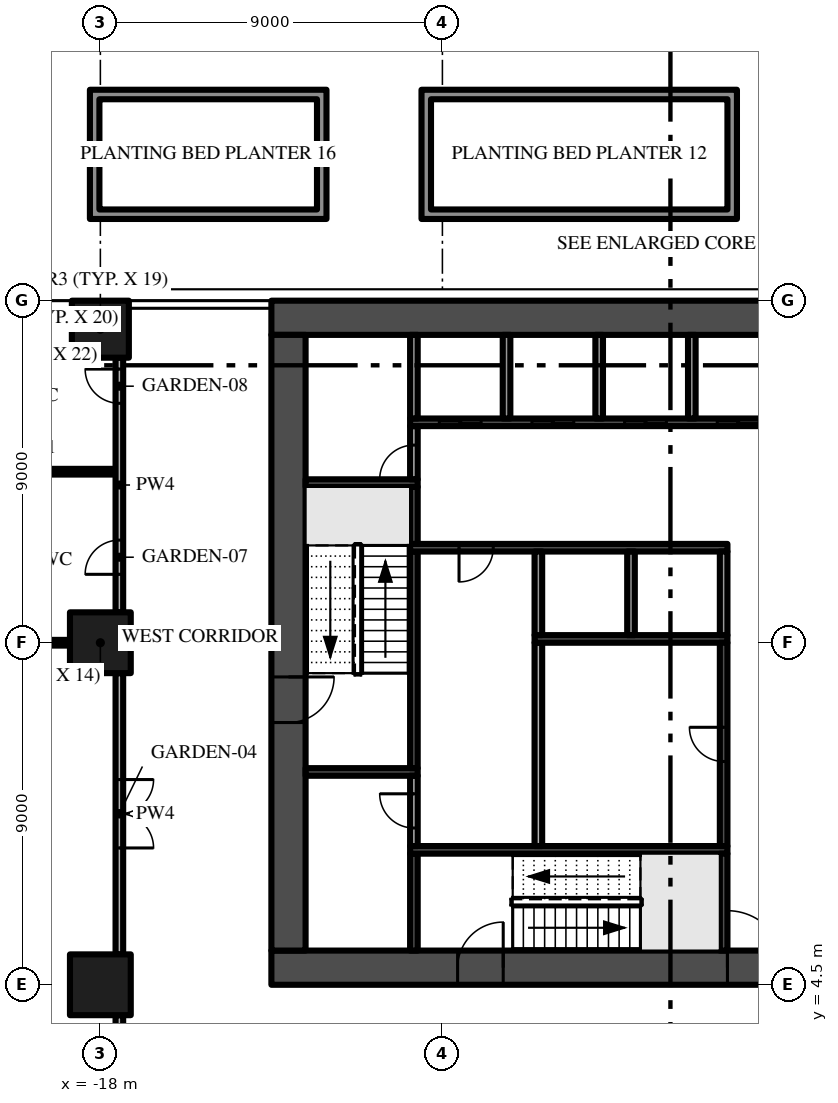
"""IFC4 building model, lengths in metres.
Left out: names, types, materials, properties, quantities, classifications, styles, units other than length and angle.
Written with IfcOpenShell. Run it as: python <this file> out.ifc"""

import sys

from ifc_helpers import new_model, si_unit, direction, frame, frame_2d, origin, origin_2d, place, context, subcontext, project, spatial, polyline, rectangle, outline, extrude, element, fill, save


model = new_model("IFC4")
c1 = context("Model", 3, precision=1e-05, world=origin(), true_north=direction((0.0, 1.0)))
c2 = subcontext(c1, "Body", "Model", "MODEL_VIEW")
j1 = project(units=[si_unit("LENGTHUNIT", "METRE"), si_unit("PLANEANGLEUNIT", "RADIAN")], contexts=[c1])
p1 = place(None, origin())
s1 = spatial("IfcSite", under=j1, at=p1, CompositionType="ELEMENT")
p2 = place(p1, origin())
s2 = spatial("IfcBuilding", under=s1, at=p2, CompositionType="ELEMENT")
p3 = place(p2, frame((0.0, 0.0, 10.5)))
s3 = spatial("IfcBuildingStorey", under=s2, at=p3, CompositionType="ELEMENT", Elevation=10.5)
p4 = place(p3, frame((-13.5, 4.95, -0.35), z_axis=(0.0, 0.0, 1.0), x_axis=(1.0, 0.0, 0.0)))
e1 = element("IfcWall", 1, at=p4, inside=s3, PredefinedType="SHEAR", context=c2, shape_type="SweptSolid", body=[
    extrude(rectangle(XDim=27.0, YDim=0.9, at=frame_2d((13.5, 0.0))), origin(), (0.0, 0.0, 1.0), 4.55),
])
p5 = place(p4, frame((12.0, 0.0, 0.35)))
e2 = element("IfcOpeningElement", 2, at=p5, cuts=e1, PredefinedType="OPENING", context=c2, shape_type="SweptSolid", body=[
    extrude(rectangle(XDim=3.0, YDim=2.4, at=frame_2d((1.5, 1.2))), frame((0.0, 0.46, 0.0), z_axis=(0.0, -1.0, 0.0), x_axis=(1.0, 0.0, 0.0)), (0.0, 0.0, 1.0), 0.92),
])
p6 = place(p4, frame((4.9, 0.0, 0.35)))
e3 = element("IfcOpeningElement", 3, at=p6, cuts=e1, PredefinedType="OPENING", context=c2, shape_type="SweptSolid", body=[
    extrude(rectangle(XDim=1.2, YDim=2.2, at=frame_2d((0.6, 1.1))), frame((0.0, 0.46, 0.0), z_axis=(0.0, -1.0, 0.0), x_axis=(1.0, 0.0, 0.0)), (0.0, 0.0, 1.0), 0.92),
])
p7 = place(p4, frame((20.75, 0.0, 0.35)))
e4 = element("IfcOpeningElement", 4, at=p7, cuts=e1, PredefinedType="OPENING", context=c2, shape_type="SweptSolid", body=[
    extrude(rectangle(XDim=1.5, YDim=2.2, at=frame_2d((0.75, 1.1))), frame((0.0, 0.46, 0.0), z_axis=(0.0, -1.0, 0.0), x_axis=(1.0, 0.0, 0.0)), (0.0, 0.0, 1.0), 0.92),
])
p8 = place(p4, frame((17.4, 0.0, 0.35)))
e5 = element("IfcOpeningElement", 5, at=p8, cuts=e1, PredefinedType="OPENING", context=c2, shape_type="SweptSolid", body=[
    extrude(rectangle(XDim=1.2, YDim=2.2, at=frame_2d((0.6, 1.1))), frame((0.0, 0.46, 0.0), z_axis=(0.0, -1.0, 0.0), x_axis=(1.0, 0.0, 0.0)), (0.0, 0.0, 1.0), 0.92),
])
p9 = place(p3, frame((13.5, 22.05, -0.35), z_axis=(0.0, 0.0, 1.0), x_axis=(-1.0, 0.0, 0.0)))
e6 = element("IfcWall", 6, at=p9, inside=s3, PredefinedType="SHEAR", context=c2, shape_type="SweptSolid", body=[
    extrude(rectangle(XDim=27.0, YDim=0.9, at=frame_2d((13.5, 0.0))), origin(), (0.0, 0.0, 1.0), 4.55),
])
p10 = place(p3, frame((-13.05, 21.6, -0.35), z_axis=(0.0, 0.0, 1.0), x_axis=(0.0, -1.0, 0.0)))
e7 = element("IfcWall", 7, at=p10, inside=s3, PredefinedType="SHEAR", context=c2, shape_type="SweptSolid", body=[
    extrude(rectangle(XDim=16.2, YDim=0.9, at=frame_2d((8.1, 0.0))), origin(), (0.0, 0.0, 1.0), 4.55),
])
p11 = place(p10, frame((9.0, 0.0, 0.35)))
e8 = element("IfcOpeningElement", 8, at=p11, cuts=e7, PredefinedType="OPENING", context=c2, shape_type="SweptSolid", body=[
    extrude(rectangle(XDim=1.2, YDim=2.2, at=frame_2d((0.6, 1.1))), frame((0.0, 0.46, 0.0), z_axis=(0.0, -1.0, 0.0), x_axis=(1.0, 0.0, 0.0)), (0.0, 0.0, 1.0), 0.92),
])
p12 = place(p3, frame((-18.0, 13.5, 0.0), z_axis=(0.0, 0.0, 1.0), x_axis=(1.0, 0.0, 0.0)))
e9 = element("IfcColumn", 9, at=p12, inside=s3, PredefinedType="COLUMN", context=c2, shape_type="SweptSolid", body=[
    extrude(rectangle(XDim=1.6, YDim=1.6, at=origin_2d()), origin(), (0.0, 0.0, 1.0), 4.2),
])
p13 = place(p3, frame((-18.0, 21.75, 0.0), z_axis=(0.0, 0.0, 1.0), x_axis=(1.0, 0.0, 0.0)))
e10 = element("IfcColumn", 10, at=p13, inside=s3, PredefinedType="COLUMN", context=c2, shape_type="SweptSolid", body=[
    extrude(rectangle(XDim=1.5, YDim=1.5, at=origin_2d()), origin(), (0.0, 0.0, 1.0), 4.2),
])
p14 = place(p3, frame((-18.0, 4.5, 0.0), z_axis=(0.0, 0.0, 1.0), x_axis=(1.0, 0.0, 0.0)))
e11 = element("IfcColumn", 11, at=p14, inside=s3, PredefinedType="COLUMN", context=c2, shape_type="SweptSolid", body=[
    extrude(rectangle(XDim=1.6, YDim=1.6, at=origin_2d()), origin(), (0.0, 0.0, 1.0), 4.2),
])
for number, where, z_axis, x_axis in (
    (12, (-12.6, 10.1, 0.0), (0.0, 0.0, 1.0), (1.0, 0.0, 0.0)),
    (13, (-12.6, 17.7, 0.0), (0.0, 0.0, 1.0), (1.0, 0.0, 0.0)),
):
    element("IfcWall", number, at=place(p3, frame(where, z_axis=z_axis, x_axis=x_axis)), inside=s3, PredefinedType="SHEAR", context=c2, shape_type="SweptSolid", body=[
        extrude(rectangle(XDim=2.95, YDim=0.2, at=frame_2d((1.475, 0.0))), origin(), (0.0, 0.0, 1.0), 4.2),
    ])
p15 = place(p3, frame((-9.75, 5.4, 0.0), z_axis=(0.0, 0.0, 1.0), x_axis=(0.0, 1.0, 0.0)))
e14 = element("IfcWall", 14, at=p15, inside=s3, PredefinedType="SHEAR", context=c2, shape_type="SweptSolid", body=[
    extrude(rectangle(XDim=2.55, YDim=0.2, at=frame_2d((1.275, 0.0))), origin(), (0.0, 0.0, 1.0), 4.2),
])
p16 = place(p3, frame((-9.85, 8.05, 0.0), z_axis=(0.0, 0.0, 1.0), x_axis=(1.0, 0.0, 0.0)))
e15 = element("IfcWall", 15, at=p16, inside=s3, PredefinedType="SHEAR", context=c2, shape_type="SweptSolid", body=[
    extrude(rectangle(XDim=8.35, YDim=0.2, at=frame_2d((4.175, 0.0))), origin(), (0.0, 0.0, 1.0), 4.2),
])
p17 = place(p3, frame((-9.75, 8.15, 0.0), z_axis=(0.0, 0.0, 1.0), x_axis=(0.0, 1.0, 0.0)))
e16 = element("IfcWall", 16, at=p17, inside=s3, PredefinedType="PARTITIONING", context=c2, shape_type="SweptSolid", body=[
    extrude(rectangle(XDim=1.85, YDim=0.2, at=frame_2d((0.925, 0.0))), origin(), (0.0, 0.0, 1.0), 4.2),
])
p18 = place(p17, frame((0.475, 0.0, 0.0)))
e17 = element("IfcOpeningElement", 17, at=p18, cuts=e16, PredefinedType="OPENING", context=c2, shape_type="SweptSolid", body=[
    extrude(rectangle(XDim=0.9, YDim=2.1, at=frame_2d((0.45, 1.05))), frame((0.0, 0.11, 0.0), z_axis=(0.0, -1.0, 0.0), x_axis=(1.0, 0.0, 0.0)), (0.0, 0.0, 1.0), 0.22),
])
p19 = place(p3, frame((-9.75, 10.2, 0.0), z_axis=(0.0, 0.0, 1.0), x_axis=(0.0, 1.0, 0.0)))
e18 = element("IfcWall", 18, at=p19, inside=s3, PredefinedType="SHEAR", context=c2, shape_type="SweptSolid", body=[
    extrude(rectangle(XDim=5.7, YDim=0.2, at=frame_2d((2.85, 0.0))), origin(), (0.0, 0.0, 1.0), 4.2),
])
p20 = place(p3, frame((-1.5, 16.0, 0.0), z_axis=(0.0, 0.0, 1.0), x_axis=(-1.0, 0.0, 0.0)))
e19 = element("IfcWall", 19, at=p20, inside=s3, PredefinedType="SHEAR", context=c2, shape_type="SweptSolid", body=[
    extrude(rectangle(XDim=8.35, YDim=0.2, at=frame_2d((4.175, 0.0))), origin(), (0.0, 0.0, 1.0), 4.2),
])
p21 = place(p20, frame((6.162, 0.0, 0.0)))
e20 = element("IfcOpeningElement", 20, at=p21, cuts=e19, PredefinedType="OPENING", context=c2, shape_type="SweptSolid", body=[
    extrude(rectangle(XDim=0.9, YDim=2.1, at=frame_2d((0.45, 1.05))), frame((0.0, 0.11, 0.0), z_axis=(0.0, -1.0, 0.0), x_axis=(1.0, 0.0, 0.0)), (0.0, 0.0, 1.0), 0.22),
])
p22 = place(p3, frame((-9.75, 16.1, 0.0), z_axis=(0.0, 0.0, 1.0), x_axis=(0.0, 1.0, 0.0)))
e21 = element("IfcWall", 21, at=p22, inside=s3, PredefinedType="SHEAR", context=c2, shape_type="SweptSolid", body=[
    extrude(rectangle(XDim=1.5, YDim=0.2, at=frame_2d((0.75, 0.0))), origin(), (0.0, 0.0, 1.0), 4.2),
])
p23 = place(p3, frame((-9.75, 17.8, 0.0), z_axis=(0.0, 0.0, 1.0), x_axis=(0.0, 1.0, 0.0)))
e22 = element("IfcWall", 22, at=p23, inside=s3, PredefinedType="PARTITIONING", context=c2, shape_type="SweptSolid", body=[
    extrude(rectangle(XDim=1.4, YDim=0.2, at=frame_2d((0.7, 0.0))), origin(), (0.0, 0.0, 1.0), 4.2),
])
p24 = place(p23, origin())
e23 = element("IfcOpeningElement", 23, at=p24, cuts=e22, PredefinedType="OPENING", context=c2, shape_type="SweptSolid", body=[
    extrude(rectangle(XDim=0.9, YDim=2.1, at=frame_2d((0.45, 1.05))), frame((0.0, 0.11, 0.0), z_axis=(0.0, -1.0, 0.0), x_axis=(1.0, 0.0, 0.0)), (0.0, 0.0, 1.0), 0.22),
])
p25 = place(p3, frame((-9.85, 19.3, 0.0), z_axis=(0.0, 0.0, 1.0), x_axis=(1.0, 0.0, 0.0)))
e24 = element("IfcWall", 24, at=p25, inside=s3, PredefinedType="SHEAR", context=c2, shape_type="SweptSolid", body=[
    extrude(rectangle(XDim=19.7, YDim=0.2, at=frame_2d((9.85, 0.0))), origin(), (0.0, 0.0, 1.0), 4.2),
])
p26 = place(p25, frame((0.769, 0.0, 0.0)))
e25 = element("IfcOpeningElement", 25, at=p26, cuts=e24, PredefinedType="OPENING", context=c2, shape_type="SweptSolid", body=[
    extrude(rectangle(XDim=1.1, YDim=2.1, at=frame_2d((0.55, 1.05))), frame((0.0, 0.11, 0.0), z_axis=(0.0, -1.0, 0.0), x_axis=(1.0, 0.0, 0.0)), (0.0, 0.0, 1.0), 0.22),
])
p27 = place(p25, frame((3.206, 0.0, 0.0)))
e26 = element("IfcOpeningElement", 26, at=p27, cuts=e24, PredefinedType="OPENING", context=c2, shape_type="SweptSolid", body=[
    extrude(rectangle(XDim=1.1, YDim=2.1, at=frame_2d((0.55, 1.05))), frame((0.0, 0.11, 0.0), z_axis=(0.0, -1.0, 0.0), x_axis=(1.0, 0.0, 0.0)), (0.0, 0.0, 1.0), 0.22),
])
p28 = place(p25, frame((5.644, 0.0, 0.0)))
e27 = element("IfcOpeningElement", 27, at=p28, cuts=e24, PredefinedType="OPENING", context=c2, shape_type="SweptSolid", body=[
    extrude(rectangle(XDim=1.1, YDim=2.1, at=frame_2d((0.55, 1.05))), frame((0.0, 0.11, 0.0), z_axis=(0.0, -1.0, 0.0), x_axis=(1.0, 0.0, 0.0)), (0.0, 0.0, 1.0), 0.22),
])
p29 = place(p25, frame((8.081, 0.0, 0.0)))
e28 = element("IfcOpeningElement", 28, at=p29, cuts=e24, PredefinedType="OPENING", context=c2, shape_type="SweptSolid", body=[
    extrude(rectangle(XDim=1.1, YDim=2.1, at=frame_2d((0.55, 1.05))), frame((0.0, 0.11, 0.0), z_axis=(0.0, -1.0, 0.0), x_axis=(1.0, 0.0, 0.0)), (0.0, 0.0, 1.0), 0.22),
])
for number, where, z_axis, x_axis in (
    (29, (-9.75, 19.4, 0.0), (0.0, 0.0, 1.0), (0.0, 1.0, 0.0)),
    (30, (-7.312, 19.4, 0.0), (0.0, 0.0, 1.0), (0.0, 1.0, 0.0)),
):
    element("IfcWall", number, at=place(p3, frame(where, z_axis=z_axis, x_axis=x_axis)), inside=s3, PredefinedType="PARTITIONING", context=c2, shape_type="SweptSolid", body=[
        extrude(rectangle(XDim=2.2, YDim=0.2, at=frame_2d((1.1, 0.0))), origin(), (0.0, 0.0, 1.0), 4.2),
    ])
p30 = place(p3, frame((-6.475, 8.15, 0.0), z_axis=(0.0, 0.0, 1.0), x_axis=(0.0, 1.0, 0.0)))
e31 = element("IfcWall", 31, at=p30, inside=s3, PredefinedType="PARTITIONING", context=c2, shape_type="SweptSolid", body=[
    extrude(rectangle(XDim=5.35, YDim=0.2, at=frame_2d((2.675, 0.0))), origin(), (0.0, 0.0, 1.0), 4.2),
])
p31 = place(p3, frame((-6.575, 13.6, 0.0), z_axis=(0.0, 0.0, 1.0), x_axis=(1.0, 0.0, 0.0)))
e32 = element("IfcWall", 32, at=p31, inside=s3, PredefinedType="SHEAR", context=c2, shape_type="SweptSolid", body=[
    extrude(rectangle(XDim=5.075, YDim=0.2, at=frame_2d((2.538, 0.0))), origin(), (0.0, 0.0, 1.0), 4.2),
])
for number, where, z_axis, x_axis in (
    (33, (-6.475, 13.7, 0.0), (0.0, 0.0, 1.0), (0.0, 1.0, 0.0)),
    (34, (-4.875, 19.4, 0.0), (0.0, 0.0, 1.0), (0.0, 1.0, 0.0)),
    (35, (-4.037, 13.7, 0.0), (0.0, 0.0, 1.0), (0.0, 1.0, 0.0)),
    (36, (-2.438, 19.4, 0.0), (0.0, 0.0, 1.0), (0.0, 1.0, 0.0)),
):
    element("IfcWall", number, at=place(p3, frame(where, z_axis=z_axis, x_axis=x_axis)), inside=s3, PredefinedType="PARTITIONING", context=c2, shape_type="SweptSolid", body=[
        extrude(rectangle(XDim=2.2, YDim=0.2, at=frame_2d((1.1, 0.0))), origin(), (0.0, 0.0, 1.0), 4.2),
    ])
p32 = place(p3, frame((-1.6, 5.4, 0.0), z_axis=(0.0, 0.0, 1.0), x_axis=(0.0, 1.0, 0.0)))
e37 = element("IfcWall", 37, at=p32, inside=s3, PredefinedType="SHEAR", context=c2, shape_type="SweptSolid", body=[
    extrude(rectangle(XDim=2.55, YDim=0.2, at=frame_2d((1.275, 0.0))), origin(), (0.0, 0.0, 1.0), 4.2),
])
p33 = place(p3, frame((-1.6, 8.15, 0.0), z_axis=(0.0, 0.0, 1.0), x_axis=(0.0, 1.0, 0.0)))
e38 = element("IfcWall", 38, at=p33, inside=s3, PredefinedType="SHEAR", context=c2, shape_type="SweptSolid", body=[
    extrude(rectangle(XDim=5.35, YDim=0.2, at=frame_2d((2.675, 0.0))), origin(), (0.0, 0.0, 1.0), 4.2),
])
p34 = place(p33, frame((2.225, 0.0, 0.0)))
e39 = element("IfcOpeningElement", 39, at=p34, cuts=e38, PredefinedType="OPENING", context=c2, shape_type="SweptSolid", body=[
    extrude(rectangle(XDim=0.9, YDim=2.1, at=frame_2d((0.45, 1.05))), frame((0.0, 0.11, 0.0), z_axis=(0.0, -1.0, 0.0), x_axis=(1.0, 0.0, 0.0)), (0.0, 0.0, 1.0), 0.22),
])
p35 = place(p3, frame((-1.6, 13.7, 0.0), z_axis=(0.0, 0.0, 1.0), x_axis=(0.0, 1.0, 0.0)))
e40 = element("IfcWall", 40, at=p35, inside=s3, PredefinedType="PARTITIONING", context=c2, shape_type="SweptSolid", body=[
    extrude(rectangle(XDim=2.2, YDim=0.2, at=frame_2d((1.1, 0.0))), origin(), (0.0, 0.0, 1.0), 4.2),
])
p36 = place(p3, frame((-25.5, 13.5, 0.0), z_axis=(0.0, 0.0, 1.0), x_axis=(1.0, 0.0, 0.0)))
e41 = element("IfcWall", 41, at=p36, inside=s3, PredefinedType="PARTITIONING", context=c2, shape_type="SweptSolid", body=[
    extrude(rectangle(XDim=6.7, YDim=0.15, at=frame_2d((3.35, 0.0))), origin(), (0.0, 0.0, 1.0), 4.2),
])
p37 = place(p3, frame((-21.75, 18.0, 0.0), z_axis=(0.0, 0.0, 1.0), x_axis=(1.0, 0.0, 0.0)))
e42 = element("IfcWall", 42, at=p37, inside=s3, PredefinedType="PARTITIONING", context=c2, shape_type="SweptSolid", body=[
    extrude(rectangle(XDim=4.15, YDim=0.15, at=frame_2d((2.075, 0.0))), origin(), (0.0, 0.0, 1.0), 4.2),
])
p38 = place(p3, frame((-17.5, -0.175, 0.0), z_axis=(0.0, 0.0, 1.0), x_axis=(0.0, 1.0, 0.0)))
e43 = element("IfcWall", 43, at=p38, inside=s3, PredefinedType="PARTITIONING", context=c2, shape_type="SweptSolid", body=[
    extrude(rectangle(XDim=3.875, YDim=0.2, at=frame_2d((1.938, 0.0))), origin(), (0.0, 0.0, 1.0), 4.2),
])
p39 = place(p3, frame((-17.5, 12.7, 0.0), z_axis=(0.0, 0.0, 1.0), x_axis=(0.0, -1.0, 0.0)))
e44 = element("IfcWall", 44, at=p39, inside=s3, PredefinedType="PARTITIONING", context=c2, shape_type="SweptSolid", body=[
    extrude(rectangle(XDim=7.4, YDim=0.2, at=frame_2d((3.7, 0.0))), origin(), (0.0, 0.0, 1.0), 4.2),
])
p40 = place(p39, frame((2.8, 0.0, 0.0)))
e45 = element("IfcOpeningElement", 45, at=p40, cuts=e44, PredefinedType="OPENING", context=c2, shape_type="SweptSolid", body=[
    extrude(rectangle(XDim=1.8, YDim=2.4, at=frame_2d((0.9, 1.2))), frame((0.0, 0.11, 0.0), z_axis=(0.0, -1.0, 0.0), x_axis=(1.0, 0.0, 0.0)), (0.0, 0.0, 1.0), 0.22),
])
p41 = place(p3, frame((-17.5, 14.3, 0.0), z_axis=(0.0, 0.0, 1.0), x_axis=(0.0, 1.0, 0.0)))
e46 = element("IfcWall", 46, at=p41, inside=s3, PredefinedType="PARTITIONING", context=c2, shape_type="SweptSolid", body=[
    extrude(rectangle(XDim=6.7, YDim=0.2, at=frame_2d((3.35, 0.0))), origin(), (0.0, 0.0, 1.0), 4.2),
])
p42 = place(p41, frame((1.0, 0.0, 0.0)))
e47 = element("IfcOpeningElement", 47, at=p42, cuts=e46, PredefinedType="OPENING", context=c2, shape_type="SweptSolid", body=[
    extrude(rectangle(XDim=0.9, YDim=2.1, at=frame_2d((0.45, 1.05))), frame((0.0, 0.11, 0.0), z_axis=(0.0, -1.0, 0.0), x_axis=(1.0, 0.0, 0.0)), (0.0, 0.0, 1.0), 0.22),
])
p43 = place(p41, frame((5.5, 0.0, 0.0)))
e48 = element("IfcOpeningElement", 48, at=p43, cuts=e46, PredefinedType="OPENING", context=c2, shape_type="SweptSolid", body=[
    extrude(rectangle(XDim=0.9, YDim=2.1, at=frame_2d((0.45, 1.05))), frame((0.0, 0.11, 0.0), z_axis=(0.0, -1.0, 0.0), x_axis=(1.0, 0.0, 0.0)), (0.0, 0.0, 1.0), 0.22),
])
p44 = place(p3, frame((0.0, 0.0, 0.05)))
e49 = element("IfcWall", 49, at=p44, inside=s3, PredefinedType="USERDEFINED", context=c2, shape_type="SweptSolid", body=[
    extrude(outline(polyline([(-9.55, 24.65), (-1.25, 24.65), (-1.25, 28.05), (-9.55, 28.05), (-9.55, 24.65)]), holes=[polyline([(-9.3, 27.8), (-1.5, 27.8), (-1.5, 24.9), (-9.3, 24.9), (-9.3, 27.8)])]), origin(), (0.0, 0.0, 1.0), 0.9),
])
p45 = place(p3, frame((0.0, 0.0, 0.05)))
e50 = element("IfcWall", 50, at=p45, inside=s3, PredefinedType="USERDEFINED", context=c2, shape_type="SweptSolid", body=[
    extrude(outline(polyline([(-18.275, 24.65), (-12.05, 24.65), (-12.05, 28.05), (-18.275, 28.05), (-18.275, 24.65)]), holes=[polyline([(-18.025, 27.8), (-12.3, 27.8), (-12.3, 24.9), (-18.025, 24.9), (-18.025, 27.8)])]), origin(), (0.0, 0.0, 1.0), 0.9),
])
p46 = place(p5, frame((3.0, 0.0, 0.0), z_axis=(0.0, 0.0, 1.0), x_axis=(-1.0, 0.0, 0.0)))
e51 = element("IfcDoor", 51, at=p46, inside=s3, OperationType="DOUBLE_DOOR_SINGLE_SWING", PredefinedType="DOOR", context=c2, shape_type="SweptSolid", body=[
    extrude(rectangle(XDim=3.0, YDim=2.4, at=frame_2d((1.5, 1.2))), frame((0.0, 0.025, 0.0), z_axis=(0.0, -1.0, 0.0), x_axis=(1.0, 0.0, 0.0)), (0.0, 0.0, 1.0), 0.05),
])
fill(e2, e51)
p47 = place(p11, frame((1.2, 0.0, 0.0), z_axis=(0.0, 0.0, 1.0), x_axis=(-1.0, 0.0, 0.0)))
e52 = element("IfcDoor", 52, at=p47, inside=s3, OperationType="SINGLE_SWING_RIGHT", PredefinedType="DOOR", context=c2, shape_type="SweptSolid", body=[
    extrude(rectangle(XDim=1.2, YDim=2.2, at=frame_2d((0.6, 1.1))), frame((0.0, 0.025, 0.0), z_axis=(0.0, -1.0, 0.0), x_axis=(1.0, 0.0, 0.0)), (0.0, 0.0, 1.0), 0.05),
])
fill(e8, e52)
p48 = place(p6, frame((1.2, 0.0, 0.0), z_axis=(0.0, 0.0, 1.0), x_axis=(-1.0, 0.0, 0.0)))
e53 = element("IfcDoor", 53, at=p48, inside=s3, OperationType="SINGLE_SWING_LEFT", PredefinedType="DOOR", context=c2, shape_type="SweptSolid", body=[
    extrude(rectangle(XDim=1.2, YDim=2.2, at=frame_2d((0.6, 1.1))), frame((0.0, 0.025, 0.0), z_axis=(0.0, -1.0, 0.0), x_axis=(1.0, 0.0, 0.0)), (0.0, 0.0, 1.0), 0.05),
])
fill(e3, e53)
p49 = place(p26, origin())
e54 = element("IfcDoor", 54, at=p49, inside=s3, OperationType="SLIDING_TO_LEFT", PredefinedType="DOOR", context=c2, shape_type="SweptSolid", body=[
    extrude(rectangle(XDim=1.1, YDim=2.1, at=frame_2d((0.55, 1.05))), frame((0.0, 0.025, 0.0), z_axis=(0.0, -1.0, 0.0), x_axis=(1.0, 0.0, 0.0)), (0.0, 0.0, 1.0), 0.05),
])
fill(e25, e54)
p50 = place(p27, origin())
e55 = element("IfcDoor", 55, at=p50, inside=s3, OperationType="SLIDING_TO_LEFT", PredefinedType="DOOR", context=c2, shape_type="SweptSolid", body=[
    extrude(rectangle(XDim=1.1, YDim=2.1, at=frame_2d((0.55, 1.05))), frame((0.0, 0.025, 0.0), z_axis=(0.0, -1.0, 0.0), x_axis=(1.0, 0.0, 0.0)), (0.0, 0.0, 1.0), 0.05),
])
fill(e26, e55)
p51 = place(p28, origin())
e56 = element("IfcDoor", 56, at=p51, inside=s3, OperationType="SLIDING_TO_LEFT", PredefinedType="DOOR", context=c2, shape_type="SweptSolid", body=[
    extrude(rectangle(XDim=1.1, YDim=2.1, at=frame_2d((0.55, 1.05))), frame((0.0, 0.025, 0.0), z_axis=(0.0, -1.0, 0.0), x_axis=(1.0, 0.0, 0.0)), (0.0, 0.0, 1.0), 0.05),
])
fill(e27, e56)
p52 = place(p29, origin())
e57 = element("IfcDoor", 57, at=p52, inside=s3, OperationType="SLIDING_TO_LEFT", PredefinedType="DOOR", context=c2, shape_type="SweptSolid", body=[
    extrude(rectangle(XDim=1.1, YDim=2.1, at=frame_2d((0.55, 1.05))), frame((0.0, 0.025, 0.0), z_axis=(0.0, -1.0, 0.0), x_axis=(1.0, 0.0, 0.0)), (0.0, 0.0, 1.0), 0.05),
])
fill(e28, e57)
p53 = place(p21, origin())
e58 = element("IfcDoor", 58, at=p53, inside=s3, OperationType="SINGLE_SWING_RIGHT", PredefinedType="DOOR", context=c2, shape_type="SweptSolid", body=[
    extrude(rectangle(XDim=0.9, YDim=2.1, at=frame_2d((0.45, 1.05))), frame((0.0, 0.025, 0.0), z_axis=(0.0, -1.0, 0.0), x_axis=(1.0, 0.0, 0.0)), (0.0, 0.0, 1.0), 0.05),
])
fill(e20, e58)
p54 = place(p34, origin())
e59 = element("IfcDoor", 59, at=p54, inside=s3, OperationType="SINGLE_SWING_RIGHT", PredefinedType="DOOR", context=c2, shape_type="SweptSolid", body=[
    extrude(rectangle(XDim=0.9, YDim=2.1, at=frame_2d((0.45, 1.05))), frame((0.0, 0.025, 0.0), z_axis=(0.0, -1.0, 0.0), x_axis=(1.0, 0.0, 0.0)), (0.0, 0.0, 1.0), 0.05),
])
fill(e39, e59)
p55 = place(p24, origin())
e60 = element("IfcDoor", 60, at=p55, inside=s3, OperationType="SINGLE_SWING_LEFT", PredefinedType="DOOR", context=c2, shape_type="SweptSolid", body=[
    extrude(rectangle(XDim=0.9, YDim=2.1, at=frame_2d((0.45, 1.05))), frame((0.0, 0.025, 0.0), z_axis=(0.0, -1.0, 0.0), x_axis=(1.0, 0.0, 0.0)), (0.0, 0.0, 1.0), 0.05),
])
fill(e23, e60)
p56 = place(p18, origin())
e61 = element("IfcDoor", 61, at=p56, inside=s3, OperationType="SINGLE_SWING_RIGHT", PredefinedType="DOOR", context=c2, shape_type="SweptSolid", body=[
    extrude(rectangle(XDim=0.9, YDim=2.1, at=frame_2d((0.45, 1.05))), frame((0.0, 0.025, 0.0), z_axis=(0.0, -1.0, 0.0), x_axis=(1.0, 0.0, 0.0)), (0.0, 0.0, 1.0), 0.05),
])
fill(e17, e61)
p57 = place(p40, origin())
e62 = element("IfcDoor", 62, at=p57, inside=s3, OperationType="DOUBLE_DOOR_SINGLE_SWING", PredefinedType="DOOR", context=c2, shape_type="SweptSolid", body=[
    extrude(rectangle(XDim=1.8, YDim=2.4, at=frame_2d((0.9, 1.2))), frame((0.0, 0.025, 0.0), z_axis=(0.0, -1.0, 0.0), x_axis=(1.0, 0.0, 0.0)), (0.0, 0.0, 1.0), 0.05),
])
fill(e45, e62)
p58 = place(p42, origin())
e63 = element("IfcDoor", 63, at=p58, inside=s3, OperationType="SINGLE_SWING_LEFT", PredefinedType="DOOR", context=c2, shape_type="SweptSolid", body=[
    extrude(rectangle(XDim=0.9, YDim=2.1, at=frame_2d((0.45, 1.05))), frame((0.0, 0.025, 0.0), z_axis=(0.0, -1.0, 0.0), x_axis=(1.0, 0.0, 0.0)), (0.0, 0.0, 1.0), 0.05),
])
fill(e47, e63)
p59 = place(p43, origin())
e64 = element("IfcDoor", 64, at=p59, inside=s3, OperationType="SINGLE_SWING_RIGHT", PredefinedType="DOOR", context=c2, shape_type="SweptSolid", body=[
    extrude(rectangle(XDim=0.9, YDim=2.1, at=frame_2d((0.45, 1.05))), frame((0.0, 0.025, 0.0), z_axis=(0.0, -1.0, 0.0), x_axis=(1.0, 0.0, 0.0)), (0.0, 0.0, 1.0), 0.05),
])
fill(e48, e64)
save(model, sys.argv[1])
